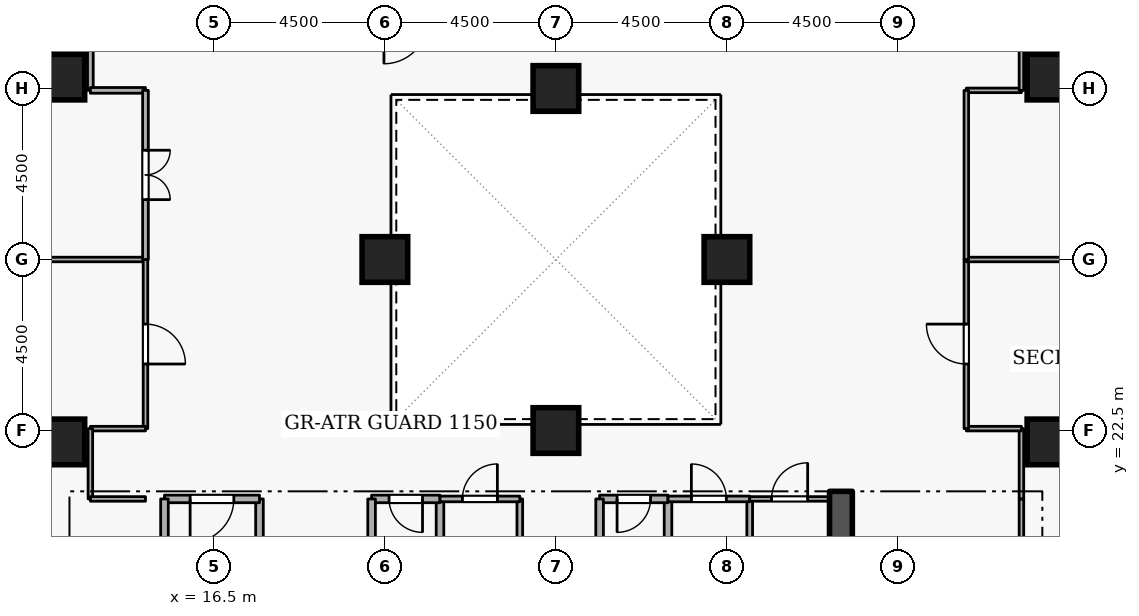
"""IFC4 building model, lengths in metres.
Left out: names, types, materials, properties, quantities, classifications, styles, units other than length and angle.
Written with IfcOpenShell. Run it as: python <this file> out.ifc"""

import sys

from ifc_helpers import new_model, si_unit, direction, frame, frame_2d, origin, origin_2d, place, context, subcontext, project, spatial, rectangle, extrude, element, fill, save


model = new_model("IFC4")
c1 = context("Model", 3, precision=1e-05, world=origin(), true_north=direction((0.0, 1.0)))
c2 = subcontext(c1, "Body", "Model", "MODEL_VIEW")
j1 = project(units=[si_unit("LENGTHUNIT", "METRE"), si_unit("PLANEANGLEUNIT", "RADIAN")], contexts=[c1])
p1 = place(None, origin())
s1 = spatial("IfcSite", under=j1, at=p1, CompositionType="ELEMENT")
p2 = place(p1, origin())
s2 = spatial("IfcBuilding", under=s1, at=p2, CompositionType="ELEMENT")
p3 = place(p2, frame((0.0, 0.0, 98.1)))
s3 = spatial("IfcBuildingStorey", under=s2, at=p3, CompositionType="ELEMENT", Elevation=98.1)
p4 = place(p3, frame((33.0, 15.2, 0.0), z_axis=(0.0, 0.0, 1.0), x_axis=(0.0, 1.0, 0.0)))
e1 = element("IfcWall", 1, at=p4, inside=s3, PredefinedType="SHEAR", context=c2, shape_type="SweptSolid", body=[
    extrude(rectangle(XDim=5.7, YDim=0.6, at=frame_2d((2.85, 0.0))), origin(), (0.0, 0.0, 1.0), 3.6),
])
for number, where, z_axis, x_axis in (
    (2, (12.5, 22.2, 0.0), (0.0, 0.0, 1.0), (1.0, 0.0, 0.0)),
    (3, (38.5, 22.2, 0.0), (0.0, 0.0, 1.0), (1.0, 0.0, 0.0)),
    (4, (12.5, 31.8, 0.0), (0.0, 0.0, 1.0), (1.0, 0.0, 0.0)),
    (5, (38.5, 31.8, 0.0), (0.0, 0.0, 1.0), (1.0, 0.0, 0.0)),
    (6, (25.5, 22.5, 0.0), (0.0, 0.0, 1.0), (1.0, 0.0, 0.0)),
    (7, (25.5, 31.5, 0.0), (0.0, 0.0, 1.0), (1.0, 0.0, 0.0)),
    (8, (21.0, 27.0, 0.0), (0.0, 0.0, 1.0), (1.0, 0.0, 0.0)),
    (9, (30.0, 27.0, 0.0), (0.0, 0.0, 1.0), (1.0, 0.0, 0.0)),
):
    element("IfcColumn", number, at=place(p3, frame(where, z_axis=z_axis, x_axis=x_axis)), inside=s3, PredefinedType="COLUMN", context=c2, shape_type="SweptSolid", body=[
        extrude(rectangle(XDim=1.2, YDim=1.2, at=origin_2d()), origin(), (0.0, 0.0, 1.0), 3.6),
    ])
p5 = place(p3, frame((17.7, 18.4, 0.0), z_axis=(0.0, 0.0, 1.0), x_axis=(0.0, 1.0, 0.0)))
e10 = element("IfcWall", 10, at=p5, inside=s3, PredefinedType="STANDARD", context=c2, shape_type="SweptSolid", body=[
    extrude(rectangle(XDim=2.3, YDim=0.2, at=frame_2d((1.15, 0.0))), origin(), (0.0, 0.0, 1.0), 2.505),
])
p6 = place(p3, frame((17.7, 20.7, 0.0), z_axis=(0.0, 0.0, 1.0), x_axis=(-1.0, 0.0, 0.0)))
e11 = element("IfcWall", 11, at=p6, inside=s3, PredefinedType="STANDARD", context=c2, shape_type="SweptSolid", body=[
    extrude(rectangle(XDim=2.5, YDim=0.2, at=frame_2d((1.25, 0.0))), origin(), (0.0, 0.0, 1.0), 3.3),
])
p7 = place(p6, frame((0.675, 0.0, 0.0)))
e12 = element("IfcOpeningElement", 12, at=p7, cuts=e11, PredefinedType="OPENING", context=c2, shape_type="SweptSolid", body=[
    extrude(rectangle(XDim=1.15, YDim=2.1, at=frame_2d((0.575, 1.05))), frame((0.0, 0.11, 0.0), z_axis=(0.0, -1.0, 0.0), x_axis=(1.0, 0.0, 0.0)), (0.0, 0.0, 1.0), 0.22),
])
p8 = place(p3, frame((15.2, 20.7, 0.0), z_axis=(0.0, 0.0, 1.0), x_axis=(0.0, -1.0, 0.0)))
e13 = element("IfcWall", 13, at=p8, inside=s3, PredefinedType="STANDARD", context=c2, shape_type="SweptSolid", body=[
    extrude(rectangle(XDim=5.7, YDim=0.2, at=frame_2d((2.85, 0.0))), origin(), (0.0, 0.0, 1.0), 3.3),
])
p9 = place(p3, frame((28.45, 18.65, 0.0), z_axis=(0.0, 0.0, 1.0), x_axis=(0.0, 1.0, 0.0)))
e14 = element("IfcWall", 14, at=p9, inside=s3, PredefinedType="STANDARD", context=c2, shape_type="SweptSolid", body=[
    extrude(rectangle(XDim=2.05, YDim=0.2, at=frame_2d((1.025, 0.0))), origin(), (0.0, 0.0, 1.0), 3.3),
])
p10 = place(p3, frame((28.45, 20.7, 0.0), z_axis=(0.0, 0.0, 1.0), x_axis=(-1.0, 0.0, 0.0)))
e15 = element("IfcWall", 15, at=p10, inside=s3, PredefinedType="STANDARD", context=c2, shape_type="SweptSolid", body=[
    extrude(rectangle(XDim=1.8, YDim=0.2, at=frame_2d((0.9, 0.0))), origin(), (0.0, 0.0, 1.0), 3.3),
])
p11 = place(p10, frame((0.46, 0.0, 0.0)))
e16 = element("IfcOpeningElement", 16, at=p11, cuts=e15, PredefinedType="OPENING", context=c2, shape_type="SweptSolid", body=[
    extrude(rectangle(XDim=0.88, YDim=2.04, at=frame_2d((0.44, 1.02))), frame((0.0, 0.11, 0.0), z_axis=(0.0, -1.0, 0.0), x_axis=(1.0, 0.0, 0.0)), (0.0, 0.0, 1.0), 0.22),
])
for number, where, z_axis, x_axis in (
    (17, (26.65, 20.7, 0.0), (0.0, 0.0, 1.0), (0.0, -1.0, 0.0)),
    (18, (22.45, 18.65, 0.0), (0.0, 0.0, 1.0), (0.0, 1.0, 0.0)),
):
    element("IfcWall", number, at=place(p3, frame(where, z_axis=z_axis, x_axis=x_axis)), inside=s3, PredefinedType="STANDARD", context=c2, shape_type="SweptSolid", body=[
        extrude(rectangle(XDim=2.05, YDim=0.2, at=frame_2d((1.025, 0.0))), origin(), (0.0, 0.0, 1.0), 3.3),
    ])
p12 = place(p3, frame((22.45, 20.7, 0.0), z_axis=(0.0, 0.0, 1.0), x_axis=(-1.0, 0.0, 0.0)))
e19 = element("IfcWall", 19, at=p12, inside=s3, PredefinedType="STANDARD", context=c2, shape_type="SweptSolid", body=[
    extrude(rectangle(XDim=1.8, YDim=0.2, at=frame_2d((0.9, 0.0))), origin(), (0.0, 0.0, 1.0), 3.3),
])
p13 = place(p12, frame((0.46, 0.0, 0.0)))
e20 = element("IfcOpeningElement", 20, at=p13, cuts=e19, PredefinedType="OPENING", context=c2, shape_type="SweptSolid", body=[
    extrude(rectangle(XDim=0.88, YDim=2.04, at=frame_2d((0.44, 1.02))), frame((0.0, 0.11, 0.0), z_axis=(0.0, -1.0, 0.0), x_axis=(1.0, 0.0, 0.0)), (0.0, 0.0, 1.0), 0.22),
])
p14 = place(p3, frame((20.65, 20.7, 0.0), z_axis=(0.0, 0.0, 1.0), x_axis=(0.0, -1.0, 0.0)))
e21 = element("IfcWall", 21, at=p14, inside=s3, PredefinedType="STANDARD", context=c2, shape_type="SweptSolid", body=[
    extrude(rectangle(XDim=2.05, YDim=0.2, at=frame_2d((1.025, 0.0))), origin(), (0.0, 0.0, 1.0), 3.3),
])
p15 = place(p3, frame((24.55, 20.7, 0.0), z_axis=(0.0, 0.0, 1.0), x_axis=(0.0, -1.0, 0.0)))
e22 = element("IfcWall", 22, at=p15, inside=s3, PredefinedType="PARTITIONING", context=c2, shape_type="SweptSolid", body=[
    extrude(rectangle(XDim=2.05, YDim=0.15, at=frame_2d((1.025, 0.0))), origin(), (0.0, 0.0, 1.0), 3.3),
])
p16 = place(p3, frame((22.45, 20.7, 0.0), z_axis=(0.0, 0.0, 1.0), x_axis=(1.0, 0.0, 0.0)))
e23 = element("IfcWall", 23, at=p16, inside=s3, PredefinedType="PARTITIONING", context=c2, shape_type="SweptSolid", body=[
    extrude(rectangle(XDim=2.1, YDim=0.15, at=frame_2d((1.05, 0.0))), origin(), (0.0, 0.0, 1.0), 3.3),
])
p17 = place(p16, frame((0.59, 0.0, 0.0)))
e24 = element("IfcOpeningElement", 24, at=p17, cuts=e23, PredefinedType="OPENING", context=c2, shape_type="SweptSolid", body=[
    extrude(rectangle(XDim=0.92, YDim=2.08, at=frame_2d((0.46, 1.04))), frame((0.0, 0.085, 0.0), z_axis=(0.0, -1.0, 0.0), x_axis=(1.0, 0.0, 0.0)), (0.0, 0.0, 1.0), 0.17),
])
p18 = place(p3, frame((30.6, 20.7, 0.0), z_axis=(0.0, 0.0, 1.0), x_axis=(0.0, -1.0, 0.0)))
e25 = element("IfcWall", 25, at=p18, inside=s3, PredefinedType="PARTITIONING", context=c2, shape_type="SweptSolid", body=[
    extrude(rectangle(XDim=2.05, YDim=0.15, at=frame_2d((1.025, 0.0))), origin(), (0.0, 0.0, 1.0), 3.3),
])
p19 = place(p3, frame((28.45, 20.7, 0.0), z_axis=(0.0, 0.0, 1.0), x_axis=(1.0, 0.0, 0.0)))
e26 = element("IfcWall", 26, at=p19, inside=s3, PredefinedType="PARTITIONING", context=c2, shape_type="SweptSolid", body=[
    extrude(rectangle(XDim=2.15, YDim=0.15, at=frame_2d((1.075, 0.0))), origin(), (0.0, 0.0, 1.0), 3.3),
])
p20 = place(p19, frame((0.615, 0.0, 0.0)))
e27 = element("IfcOpeningElement", 27, at=p20, cuts=e26, PredefinedType="OPENING", context=c2, shape_type="SweptSolid", body=[
    extrude(rectangle(XDim=0.92, YDim=2.08, at=frame_2d((0.46, 1.04))), frame((0.0, 0.085, 0.0), z_axis=(0.0, -1.0, 0.0), x_axis=(1.0, 0.0, 0.0)), (0.0, 0.0, 1.0), 0.17),
])
p21 = place(p3, frame((30.6, 20.7, 0.0), z_axis=(0.0, 0.0, 1.0), x_axis=(1.0, 0.0, 0.0)))
e28 = element("IfcWall", 28, at=p21, inside=s3, PredefinedType="PARTITIONING", context=c2, shape_type="SweptSolid", body=[
    extrude(rectangle(XDim=2.1, YDim=0.12, at=frame_2d((1.05, 0.0))), origin(), (0.0, 0.0, 1.0), 3.3),
])
p22 = place(p21, frame((0.575, 0.0, 0.0)))
e29 = element("IfcOpeningElement", 29, at=p22, cuts=e28, PredefinedType="OPENING", context=c2, shape_type="SweptSolid", body=[
    extrude(rectangle(XDim=0.95, YDim=2.1, at=frame_2d((0.475, 1.05))), frame((0.0, 0.07, 0.0), z_axis=(0.0, -1.0, 0.0), x_axis=(1.0, 0.0, 0.0)), (0.0, 0.0, 1.0), 0.14),
])
p23 = place(p3, frame((1.58, 27.0, 0.0), z_axis=(0.0, 0.0, 1.0), x_axis=(1.0, 0.0, 0.0)))
e30 = element("IfcWall", 30, at=p23, inside=s3, PredefinedType="PARTITIONING", context=c2, shape_type="SweptSolid", body=[
    extrude(rectangle(XDim=13.12, YDim=0.12, at=frame_2d((6.56, 0.0))), origin(), (0.0, 0.0, 1.0), 2.838),
])
p24 = place(p3, frame((14.7, 27.0, 0.0), z_axis=(0.0, 0.0, 1.0), x_axis=(0.0, -1.0, 0.0)))
e31 = element("IfcWall", 31, at=p24, inside=s3, PredefinedType="PARTITIONING", context=c2, shape_type="SweptSolid", body=[
    extrude(rectangle(XDim=4.45, YDim=0.12, at=frame_2d((2.225, 0.0))), origin(), (0.0, 0.0, 1.0), 3.3),
])
p25 = place(p24, frame((1.7, 0.0, 0.0)))
e32 = element("IfcOpeningElement", 32, at=p25, cuts=e31, PredefinedType="OPENING", context=c2, shape_type="SweptSolid", body=[
    extrude(rectangle(XDim=1.05, YDim=2.1, at=frame_2d((0.525, 1.05))), frame((0.0, 0.07, 0.0), z_axis=(0.0, -1.0, 0.0), x_axis=(1.0, 0.0, 0.0)), (0.0, 0.0, 1.0), 0.14),
])
p26 = place(p3, frame((14.7, 22.55, 0.0), z_axis=(0.0, 0.0, 1.0), x_axis=(-1.0, 0.0, 0.0)))
e33 = element("IfcWall", 33, at=p26, inside=s3, PredefinedType="PARTITIONING", context=c2, shape_type="SweptSolid", body=[
    extrude(rectangle(XDim=1.45, YDim=0.12, at=frame_2d((0.725, 0.0))), origin(), (0.0, 0.0, 1.0), 3.3),
])
p27 = place(p3, frame((13.25, 22.55, 0.0), z_axis=(0.0, 0.0, 1.0), x_axis=(0.0, -1.0, 0.0)))
e34 = element("IfcWall", 34, at=p27, inside=s3, PredefinedType="PARTITIONING", context=c2, shape_type="SweptSolid", body=[
    extrude(rectangle(XDim=1.85, YDim=0.12, at=frame_2d((0.925, 0.0))), origin(), (0.0, 0.0, 1.0), 3.3),
])
p28 = place(p3, frame((13.25, 20.7, 0.0), z_axis=(0.0, 0.0, 1.0), x_axis=(1.0, 0.0, 0.0)))
e35 = element("IfcWall", 35, at=p28, inside=s3, PredefinedType="PARTITIONING", context=c2, shape_type="SweptSolid", body=[
    extrude(rectangle(XDim=1.45, YDim=0.12, at=frame_2d((0.725, 0.0))), origin(), (0.0, 0.0, 1.0), 3.3),
])
p29 = place(p3, frame((13.25, 33.3, 0.0), z_axis=(0.0, 0.0, 1.0), x_axis=(0.0, -1.0, 0.0)))
e36 = element("IfcWall", 36, at=p29, inside=s3, PredefinedType="PARTITIONING", context=c2, shape_type="SweptSolid", body=[
    extrude(rectangle(XDim=1.85, YDim=0.15, at=frame_2d((0.925, 0.0))), origin(), (0.0, 0.0, 1.0), 3.3),
])
p30 = place(p3, frame((13.25, 31.45, 0.0), z_axis=(0.0, 0.0, 1.0), x_axis=(1.0, 0.0, 0.0)))
e37 = element("IfcWall", 37, at=p30, inside=s3, PredefinedType="PARTITIONING", context=c2, shape_type="SweptSolid", body=[
    extrude(rectangle(XDim=1.45, YDim=0.15, at=frame_2d((0.725, 0.0))), origin(), (0.0, 0.0, 1.0), 3.3),
])
p31 = place(p3, frame((14.7, 31.45, 0.0), z_axis=(0.0, 0.0, 1.0), x_axis=(0.0, -1.0, 0.0)))
e38 = element("IfcWall", 38, at=p31, inside=s3, PredefinedType="PARTITIONING", context=c2, shape_type="SweptSolid", body=[
    extrude(rectangle(XDim=4.45, YDim=0.15, at=frame_2d((2.225, 0.0))), origin(), (0.0, 0.0, 1.0), 3.3),
])
p32 = place(p31, frame((1.575, 0.0, 0.0)))
e39 = element("IfcOpeningElement", 39, at=p32, cuts=e38, PredefinedType="OPENING", context=c2, shape_type="SweptSolid", body=[
    extrude(rectangle(XDim=1.3, YDim=2.12, at=frame_2d((0.65, 1.06))), frame((0.0, 0.085, 0.0), z_axis=(0.0, -1.0, 0.0), x_axis=(1.0, 0.0, 0.0)), (0.0, 0.0, 1.0), 0.17),
])
p33 = place(p3, frame((37.75, 17.55, 0.0), z_axis=(0.0, 0.0, 1.0), x_axis=(0.0, 1.0, 0.0)))
e40 = element("IfcWall", 40, at=p33, inside=s3, PredefinedType="PARTITIONING", context=c2, shape_type="SweptSolid", body=[
    extrude(rectangle(XDim=3.15, YDim=0.12, at=frame_2d((1.575, 0.0))), origin(), (0.0, 0.0, 1.0), 3.3),
])
p34 = place(p3, frame((37.75, 20.7, 0.0), z_axis=(0.0, 0.0, 1.0), x_axis=(0.0, 1.0, 0.0)))
e41 = element("IfcWall", 41, at=p34, inside=s3, PredefinedType="PARTITIONING", context=c2, shape_type="SweptSolid", body=[
    extrude(rectangle(XDim=1.85, YDim=0.12, at=frame_2d((0.925, 0.0))), origin(), (0.0, 0.0, 1.0), 3.3),
])
p35 = place(p3, frame((37.75, 22.55, 0.0), z_axis=(0.0, 0.0, 1.0), x_axis=(-1.0, 0.0, 0.0)))
e42 = element("IfcWall", 42, at=p35, inside=s3, PredefinedType="PARTITIONING", context=c2, shape_type="SweptSolid", body=[
    extrude(rectangle(XDim=1.45, YDim=0.12, at=frame_2d((0.725, 0.0))), origin(), (0.0, 0.0, 1.0), 3.3),
])
p36 = place(p3, frame((36.3, 22.55, 0.0), z_axis=(0.0, 0.0, 1.0), x_axis=(0.0, 1.0, 0.0)))
e43 = element("IfcWall", 43, at=p36, inside=s3, PredefinedType="PARTITIONING", context=c2, shape_type="SweptSolid", body=[
    extrude(rectangle(XDim=4.45, YDim=0.12, at=frame_2d((2.225, 0.0))), origin(), (0.0, 0.0, 1.0), 3.3),
])
p37 = place(p36, frame((1.7, 0.0, 0.0)))
e44 = element("IfcOpeningElement", 44, at=p37, cuts=e43, PredefinedType="OPENING", context=c2, shape_type="SweptSolid", body=[
    extrude(rectangle(XDim=1.05, YDim=2.1, at=frame_2d((0.525, 1.05))), frame((0.0, 0.07, 0.0), z_axis=(0.0, -1.0, 0.0), x_axis=(1.0, 0.0, 0.0)), (0.0, 0.0, 1.0), 0.14),
])
p38 = place(p3, frame((36.3, 27.0, 0.0), z_axis=(0.0, 0.0, 1.0), x_axis=(1.0, 0.0, 0.0)))
e45 = element("IfcWall", 45, at=p38, inside=s3, PredefinedType="PARTITIONING", context=c2, shape_type="SweptSolid", body=[
    extrude(rectangle(XDim=7.12, YDim=0.12, at=frame_2d((3.56, 0.0))), origin(), (0.0, 0.0, 1.0), 2.838),
])
p39 = place(p3, frame((36.3, 31.45, 0.0), z_axis=(0.0, 0.0, 1.0), x_axis=(1.0, 0.0, 0.0)))
e46 = element("IfcWall", 46, at=p39, inside=s3, PredefinedType="PARTITIONING", context=c2, shape_type="SweptSolid", body=[
    extrude(rectangle(XDim=1.45, YDim=0.12, at=frame_2d((0.725, 0.0))), origin(), (0.0, 0.0, 1.0), 3.3),
])
p40 = place(p3, frame((37.75, 31.45, 0.0), z_axis=(0.0, 0.0, 1.0), x_axis=(0.0, 1.0, 0.0)))
e47 = element("IfcWall", 47, at=p40, inside=s3, PredefinedType="PARTITIONING", context=c2, shape_type="SweptSolid", body=[
    extrude(rectangle(XDim=1.85, YDim=0.12, at=frame_2d((0.925, 0.0))), origin(), (0.0, 0.0, 1.0), 3.3),
])
p41 = place(p3, frame((36.3, 27.0, 0.0), z_axis=(0.0, 0.0, 1.0), x_axis=(0.0, 1.0, 0.0)))
e48 = element("IfcWall", 48, at=p41, inside=s3, PredefinedType="PARTITIONING", context=c2, shape_type="SweptSolid", body=[
    extrude(rectangle(XDim=4.45, YDim=0.12, at=frame_2d((2.225, 0.0))), origin(), (0.0, 0.0, 1.0), 3.3),
])
p42 = place(p7, origin())
e49 = element("IfcDoor", 49, at=p42, inside=s3, OperationType="SINGLE_SWING_RIGHT", PredefinedType="DOOR", context=c2, shape_type="SweptSolid", body=[
    extrude(rectangle(XDim=1.15, YDim=2.1, at=frame_2d((0.575, 1.05))), frame((0.0, 0.025, 0.0), z_axis=(0.0, -1.0, 0.0), x_axis=(1.0, 0.0, 0.0)), (0.0, 0.0, 1.0), 0.05),
])
fill(e12, e49)
p43 = place(p11, origin())
e50 = element("IfcDoor", 50, at=p43, inside=s3, OperationType="SINGLE_SWING_RIGHT", PredefinedType="DOOR", context=c2, shape_type="SweptSolid", body=[
    extrude(rectangle(XDim=0.88, YDim=2.04, at=frame_2d((0.44, 1.02))), frame((0.0, 0.025, 0.0), z_axis=(0.0, -1.0, 0.0), x_axis=(1.0, 0.0, 0.0)), (0.0, 0.0, 1.0), 0.05),
])
fill(e16, e50)
p44 = place(p13, origin())
e51 = element("IfcDoor", 51, at=p44, inside=s3, OperationType="SINGLE_SWING_LEFT", PredefinedType="DOOR", context=c2, shape_type="SweptSolid", body=[
    extrude(rectangle(XDim=0.88, YDim=2.04, at=frame_2d((0.44, 1.02))), frame((0.0, 0.025, 0.0), z_axis=(0.0, -1.0, 0.0), x_axis=(1.0, 0.0, 0.0)), (0.0, 0.0, 1.0), 0.05),
])
fill(e20, e51)
p45 = place(p17, origin())
e52 = element("IfcDoor", 52, at=p45, inside=s3, OperationType="SINGLE_SWING_RIGHT", PredefinedType="DOOR", context=c2, shape_type="SweptSolid", body=[
    extrude(rectangle(XDim=0.92, YDim=2.08, at=frame_2d((0.46, 1.04))), frame((0.0, 0.025, 0.0), z_axis=(0.0, -1.0, 0.0), x_axis=(1.0, 0.0, 0.0)), (0.0, 0.0, 1.0), 0.05),
])
fill(e24, e52)
p46 = place(p20, origin())
e53 = element("IfcDoor", 53, at=p46, inside=s3, OperationType="SINGLE_SWING_LEFT", PredefinedType="DOOR", context=c2, shape_type="SweptSolid", body=[
    extrude(rectangle(XDim=0.92, YDim=2.08, at=frame_2d((0.46, 1.04))), frame((0.0, 0.025, 0.0), z_axis=(0.0, -1.0, 0.0), x_axis=(1.0, 0.0, 0.0)), (0.0, 0.0, 1.0), 0.05),
])
fill(e27, e53)
p47 = place(p22, origin())
e54 = element("IfcDoor", 54, at=p47, inside=s3, OperationType="SINGLE_SWING_RIGHT", PredefinedType="DOOR", context=c2, shape_type="SweptSolid", body=[
    extrude(rectangle(XDim=0.95, YDim=2.1, at=frame_2d((0.475, 1.05))), frame((0.0, 0.025, 0.0), z_axis=(0.0, -1.0, 0.0), x_axis=(1.0, 0.0, 0.0)), (0.0, 0.0, 1.0), 0.05),
])
fill(e29, e54)
p48 = place(p25, origin())
e55 = element("IfcDoor", 55, at=p48, inside=s3, OperationType="SINGLE_SWING_RIGHT", PredefinedType="DOOR", context=c2, shape_type="SweptSolid", body=[
    extrude(rectangle(XDim=1.05, YDim=2.1, at=frame_2d((0.525, 1.05))), frame((0.0, 0.025, 0.0), z_axis=(0.0, -1.0, 0.0), x_axis=(1.0, 0.0, 0.0)), (0.0, 0.0, 1.0), 0.05),
])
fill(e32, e55)
p49 = place(p32, origin())
e56 = element("IfcDoor", 56, at=p49, inside=s3, OperationType="DOUBLE_DOOR_SINGLE_SWING", PredefinedType="DOOR", context=c2, shape_type="SweptSolid", body=[
    extrude(rectangle(XDim=1.3, YDim=2.12, at=frame_2d((0.65, 1.06))), frame((0.0, 0.025, 0.0), z_axis=(0.0, -1.0, 0.0), x_axis=(1.0, 0.0, 0.0)), (0.0, 0.0, 1.0), 0.05),
])
fill(e39, e56)
p50 = place(p37, origin())
e57 = element("IfcDoor", 57, at=p50, inside=s3, OperationType="SINGLE_SWING_RIGHT", PredefinedType="DOOR", context=c2, shape_type="SweptSolid", body=[
    extrude(rectangle(XDim=1.05, YDim=2.1, at=frame_2d((0.525, 1.05))), frame((0.0, 0.025, 0.0), z_axis=(0.0, -1.0, 0.0), x_axis=(1.0, 0.0, 0.0)), (0.0, 0.0, 1.0), 0.05),
])
fill(e44, e57)
save(model, sys.argv[1])
